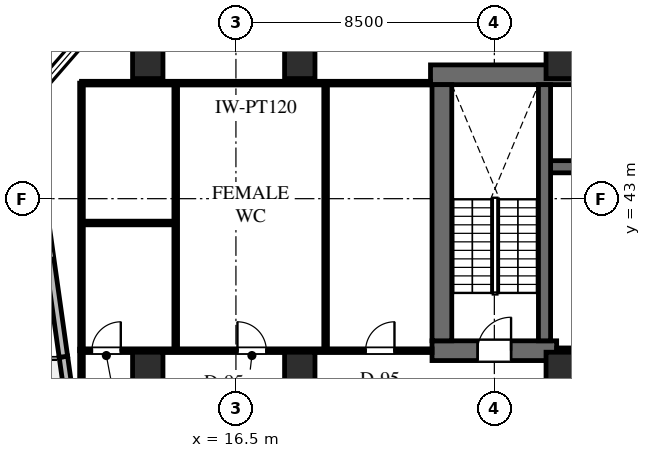
"""IFC4 building model, lengths in metres.
Left out: names, types, materials, properties, quantities, classifications, styles, units other than length and angle.
Written with IfcOpenShell. Run it as: python <this file> out.ifc"""

import sys

from ifc_helpers import new_model, si_unit, direction, frame, frame_2d, origin, origin_2d, place, context, subcontext, project, spatial, rectangle, extrude, element, fill, save


model = new_model("IFC4")
c1 = context("Model", 3, precision=1e-05, world=origin(), true_north=direction((0.0, 1.0)))
c2 = subcontext(c1, "Body", "Model", "MODEL_VIEW")
j1 = project(units=[si_unit("LENGTHUNIT", "METRE"), si_unit("PLANEANGLEUNIT", "RADIAN")], contexts=[c1])
p1 = place(None, origin())
s1 = spatial("IfcSite", under=j1, at=p1, CompositionType="ELEMENT")
p2 = place(p1, origin())
s2 = spatial("IfcBuilding", under=s1, at=p2, CompositionType="ELEMENT")
p3 = place(p2, frame((0.0, 0.0, 96.0)))
s3 = spatial("IfcBuildingStorey", under=s2, at=p3, CompositionType="ELEMENT", Elevation=96.0)
p4 = place(p3, frame((22.9, 47.075, 0.0), z_axis=(0.0, 0.0, 1.0), x_axis=(1.0, 0.0, 0.0)))
e1 = element("IfcWall", 1, at=p4, inside=s3, PredefinedType="SHEAR", context=c2, shape_type="SweptSolid", body=[
    extrude(rectangle(XDim=43.6, YDim=0.65, at=frame_2d((21.8, 0.0))), origin(), (0.0, 0.0, 1.0), 4.0),
])
p5 = place(p3, frame((26.85, 44.05, 0.0), z_axis=(0.0, 0.0, 1.0), x_axis=(1.0, 0.0, 0.0)))
e2 = element("IfcWall", 2, at=p5, inside=s3, PredefinedType="SHEAR", context=c2, shape_type="SweptSolid", body=[
    extrude(rectangle(XDim=7.95, YDim=0.4, at=frame_2d((3.975, 0.0))), origin(), (0.0, 0.0, 1.0), 4.0),
])
p6 = place(p3, frame((22.95, 38.0, 0.0), z_axis=(0.0, 0.0, 1.0), x_axis=(1.0, 0.0, 0.0)))
e3 = element("IfcWall", 3, at=p6, inside=s3, PredefinedType="SHEAR", context=c2, shape_type="SweptSolid", body=[
    extrude(rectangle(XDim=4.1, YDim=0.65, at=frame_2d((2.05, 0.0))), origin(), (0.0, 0.0, 1.0), 4.0),
])
p7 = place(p6, frame((1.5, 0.0, 0.0)))
e4 = element("IfcOpeningElement", 4, at=p7, cuts=e3, PredefinedType="OPENING", context=c2, shape_type="SweptSolid", body=[
    extrude(rectangle(XDim=1.1, YDim=2.2, at=frame_2d((0.55, 1.1))), frame((0.0, 0.335, 0.0), z_axis=(0.0, -1.0, 0.0), x_axis=(1.0, 0.0, 0.0)), (0.0, 0.0, 1.0), 0.67),
])
p8 = place(p3, frame((23.275, 38.325, 0.0), z_axis=(0.0, 0.0, 1.0), x_axis=(0.0, 1.0, 0.0)))
e5 = element("IfcWall", 5, at=p8, inside=s3, PredefinedType="SHEAR", context=c2, shape_type="SweptSolid", body=[
    extrude(rectangle(XDim=8.425, YDim=0.65, at=frame_2d((4.212, 0.0))), origin(), (0.0, 0.0, 1.0), 4.0),
])
p9 = place(p3, frame((26.65, 38.325, 0.0), z_axis=(0.0, 0.0, 1.0), x_axis=(0.0, 1.0, 0.0)))
e6 = element("IfcWall", 6, at=p9, inside=s3, PredefinedType="SHEAR", context=c2, shape_type="SweptSolid", body=[
    extrude(rectangle(XDim=8.425, YDim=0.4, at=frame_2d((4.212, 0.0))), origin(), (0.0, 0.0, 1.0), 4.0),
])
for number, where, z_axis, x_axis in (
    (7, (27.2, 37.35, 0.0), (0.0, 0.0, 1.0), (1.0, 0.0, 0.0)),
    (8, (27.2, 47.55, 0.0), (0.0, 0.0, 1.0), (1.0, 0.0, 0.0)),
    (9, (18.6, 37.35, 0.0), (0.0, 0.0, 1.0), (1.0, 0.0, 0.0)),
    (10, (18.6, 47.55, 0.0), (0.0, 0.0, 1.0), (1.0, 0.0, 0.0)),
    (11, (13.6, 37.35, 0.0), (0.0, 0.0, 1.0), (1.0, 0.0, 0.0)),
    (12, (13.6, 47.55, 0.0), (0.0, 0.0, 1.0), (1.0, 0.0, 0.0)),
):
    element("IfcColumn", number, at=place(p3, frame(where, z_axis=z_axis, x_axis=x_axis)), inside=s3, PredefinedType="COLUMN", context=c2, shape_type="SweptSolid", body=[
        extrude(rectangle(XDim=1.0, YDim=1.2, at=origin_2d()), origin(), (0.0, 0.0, 1.0), 4.0),
    ])
p10 = place(p3, frame((14.938, 8.539, 0.0), z_axis=(0.0, 0.0, 1.0), x_axis=(-0.139178114609, 0.990267364106, 0.0)))
e13 = element("IfcWall", 13, at=p10, inside=s3, PredefinedType="STANDARD", context=c2, shape_type="SweptSolid", body=[
    extrude(rectangle(XDim=29.549, YDim=0.28, at=frame_2d((14.774, 0.0))), origin(), (0.0, 0.0, 1.0), 3.75),
])
p11 = place(p10, frame((14.224, 0.0, 0.0)))
e14 = element("IfcOpeningElement", 14, at=p11, cuts=e13, PredefinedType="OPENING", context=c2, shape_type="SweptSolid", body=[
    extrude(rectangle(XDim=1.1, YDim=2.2, at=frame_2d((0.55, 1.1))), frame((0.0, 0.15, 0.0), z_axis=(0.0, -1.0, 0.0), x_axis=(1.0, 0.0, 0.0)), (0.0, 0.0, 1.0), 0.3),
])
p12 = place(p10, frame((5.172, 0.0, 0.65)))
e15 = element("IfcOpeningElement", 15, at=p12, cuts=e13, PredefinedType="OPENING", context=c2, shape_type="SweptSolid", body=[
    extrude(rectangle(XDim=1.8, YDim=2.1, at=frame_2d((0.9, 1.05))), frame((0.0, 0.15, 0.0), z_axis=(0.0, -1.0, 0.0), x_axis=(1.0, 0.0, 0.0)), (0.0, 0.0, 1.0), 0.3),
])
p13 = place(p3, frame((10.825, 37.8, 0.0), z_axis=(0.0, 0.0, 1.0), x_axis=(-0.139180610108, 0.990267013371, 0.0)))
e16 = element("IfcWall", 16, at=p13, inside=s3, PredefinedType="STANDARD", context=c2, shape_type="SweptSolid", body=[
    extrude(rectangle(XDim=8.467, YDim=0.28, at=frame_2d((4.234, 0.0))), origin(), (0.0, 0.0, 1.0), 3.75),
])
p14 = place(p13, frame((3.273, 0.0, 0.65)))
e17 = element("IfcOpeningElement", 17, at=p14, cuts=e16, PredefinedType="OPENING", context=c2, shape_type="SweptSolid", body=[
    extrude(rectangle(XDim=1.8, YDim=2.1, at=frame_2d((0.9, 1.05))), frame((0.0, 0.15, 0.0), z_axis=(0.0, -1.0, 0.0), x_axis=(1.0, 0.0, 0.0)), (0.0, 0.0, 1.0), 0.3),
])
p15 = place(p3, frame((9.646, 46.185, 0.0), z_axis=(0.0, 0.0, 1.0), x_axis=(0.656070644076, 0.754699483226, 0.0)))
e18 = element("IfcWall", 18, at=p15, inside=s3, PredefinedType="STANDARD", context=c2, shape_type="SweptSolid", body=[
    extrude(rectangle(XDim=2.908, YDim=0.28, at=frame_2d((1.454, 0.0))), origin(), (0.0, 0.0, 1.0), 3.75),
])
p16 = place(p15, frame((0.541, 0.0, 0.65)))
e19 = element("IfcOpeningElement", 19, at=p16, cuts=e18, PredefinedType="OPENING", context=c2, shape_type="SweptSolid", body=[
    extrude(rectangle(XDim=1.8, YDim=2.1, at=frame_2d((0.9, 1.05))), frame((0.0, 0.15, 0.0), z_axis=(0.0, -1.0, 0.0), x_axis=(1.0, 0.0, 0.0)), (0.0, 0.0, 1.0), 0.3),
])
p17 = place(p3, frame((27.05, 38.0, 0.0), z_axis=(0.0, 0.0, 1.0), x_axis=(1.0, 0.0, 0.0)))
e20 = element("IfcWall", 20, at=p17, inside=s3, PredefinedType="STANDARD", context=c2, shape_type="SweptSolid", body=[
    extrude(rectangle(XDim=7.95, YDim=0.18, at=frame_2d((3.975, 0.0))), origin(), (0.0, 0.0, 1.0), 2.894),
])
p18 = place(p17, frame((2.566, 0.0, 0.0)))
e21 = element("IfcOpeningElement", 21, at=p18, cuts=e20, PredefinedType="OPENING", context=c2, shape_type="SweptSolid", body=[
    extrude(rectangle(XDim=1.05, YDim=2.2, at=frame_2d((0.525, 1.1))), frame((0.0, 0.1, 0.0), z_axis=(0.0, -1.0, 0.0), x_axis=(1.0, 0.0, 0.0)), (0.0, 0.0, 1.0), 0.2),
])
p19 = place(p3, frame((11.42, 38.0, 0.0), z_axis=(0.0, 0.0, 1.0), x_axis=(1.0, 0.0, 0.0)))
e22 = element("IfcWall", 22, at=p19, inside=s3, PredefinedType="PARTITIONING", context=c2, shape_type="SweptSolid", body=[
    extrude(rectangle(XDim=11.53, YDim=0.12, at=frame_2d((5.765, 0.0))), origin(), (0.0, 0.0, 1.0), 2.894),
])
p20 = place(p19, frame((0.343, 0.0, 0.0)))
e23 = element("IfcOpeningElement", 23, at=p20, cuts=e22, PredefinedType="OPENING", context=c2, shape_type="SweptSolid", body=[
    extrude(rectangle(XDim=0.95, YDim=2.15, at=frame_2d((0.475, 1.075))), frame((0.0, 0.07, 0.0), z_axis=(0.0, -1.0, 0.0), x_axis=(1.0, 0.0, 0.0)), (0.0, 0.0, 1.0), 0.14),
])
p21 = place(p19, frame((5.13, 0.0, 0.0)))
e24 = element("IfcOpeningElement", 24, at=p21, cuts=e22, PredefinedType="OPENING", context=c2, shape_type="SweptSolid", body=[
    extrude(rectangle(XDim=0.95, YDim=2.15, at=frame_2d((0.475, 1.075))), frame((0.0, 0.07, 0.0), z_axis=(0.0, -1.0, 0.0), x_axis=(1.0, 0.0, 0.0)), (0.0, 0.0, 1.0), 0.14),
])
p22 = place(p19, frame((9.345, 0.0, 0.0)))
e25 = element("IfcOpeningElement", 25, at=p22, cuts=e22, PredefinedType="OPENING", context=c2, shape_type="SweptSolid", body=[
    extrude(rectangle(XDim=0.95, YDim=2.15, at=frame_2d((0.475, 1.075))), frame((0.0, 0.07, 0.0), z_axis=(0.0, -1.0, 0.0), x_axis=(1.0, 0.0, 0.0)), (0.0, 0.0, 1.0), 0.14),
])
p23 = place(p3, frame((11.42, 38.0, 0.0), z_axis=(0.0, 0.0, 1.0), x_axis=(0.0, 1.0, 0.0)))
e26 = element("IfcWall", 26, at=p23, inside=s3, PredefinedType="PARTITIONING", context=c2, shape_type="SweptSolid", body=[
    extrude(rectangle(XDim=8.8, YDim=0.12, at=frame_2d((4.4, 0.0))), origin(), (0.0, 0.0, 1.0), 3.75),
])
p24 = place(p3, frame((11.42, 46.8, 0.0), z_axis=(0.0, 0.0, 1.0), x_axis=(1.0, 0.0, 0.0)))
e27 = element("IfcWall", 27, at=p24, inside=s3, PredefinedType="PARTITIONING", context=c2, shape_type="SweptSolid", body=[
    extrude(rectangle(XDim=11.48, YDim=0.12, at=frame_2d((5.74, 0.0))), origin(), (0.0, 0.0, 1.0), 2.894),
])
for number, where, z_axis, x_axis in (
    (28, (14.52, 38.068, 0.0), (0.0, 0.0, 1.0), (0.0, 1.0, 0.0)),
    (29, (19.45, 38.068, 0.0), (0.0, 0.0, 1.0), (0.0, 1.0, 0.0)),
):
    element("IfcWall", number, at=place(p3, frame(where, z_axis=z_axis, x_axis=x_axis)), inside=s3, PredefinedType="PARTITIONING", context=c2, shape_type="SweptSolid", body=[
        extrude(rectangle(XDim=8.664, YDim=0.12, at=frame_2d((4.332, 0.0))), origin(), (0.0, 0.0, 1.0), 3.75),
    ])
p25 = place(p3, frame((11.488, 42.2, 0.0), z_axis=(0.0, 0.0, 1.0), x_axis=(1.0, 0.0, 0.0)))
e30 = element("IfcWall", 30, at=p25, inside=s3, PredefinedType="PARTITIONING", context=c2, shape_type="SweptSolid", body=[
    extrude(rectangle(XDim=2.964, YDim=0.12, at=frame_2d((1.482, 0.0))), origin(), (0.0, 0.0, 1.0), 2.894),
])
p26 = place(p3, frame((11.42, 34.752, 0.0), z_axis=(0.0, 0.0, 1.0), x_axis=(0.0, 1.0, 0.0)))
e31 = element("IfcWall", 31, at=p26, inside=s3, PredefinedType="PARTITIONING", context=c2, shape_type="SweptSolid", body=[
    extrude(rectangle(XDim=3.298, YDim=0.12, at=frame_2d((1.649, 0.0))), origin(), (0.0, 0.0, 1.0), 3.75),
])
p27 = place(p16, origin())
e32 = element("IfcWindow", 32, at=p27, inside=s3, PartitioningType="SINGLE_PANEL", PredefinedType="WINDOW", context=c2, shape_type="SweptSolid", body=[
    extrude(rectangle(XDim=1.8, YDim=2.1, at=frame_2d((0.9, 1.05))), frame((0.0, 0.03, 0.0), z_axis=(0.0, -1.0, 0.0), x_axis=(1.0, 0.0, 0.0)), (0.0, 0.0, 1.0), 0.06),
])
fill(e19, e32)
p28 = place(p7, origin())
e33 = element("IfcDoor", 33, at=p28, inside=s3, OperationType="SINGLE_SWING_RIGHT", PredefinedType="DOOR", context=c2, shape_type="SweptSolid", body=[
    extrude(rectangle(XDim=1.1, YDim=2.2, at=frame_2d((0.55, 1.1))), frame((0.0, 0.025, 0.0), z_axis=(0.0, -1.0, 0.0), x_axis=(1.0, 0.0, 0.0)), (0.0, 0.0, 1.0), 0.05),
])
fill(e4, e33)
p29 = place(p20, origin())
e34 = element("IfcDoor", 34, at=p29, inside=s3, OperationType="SINGLE_SWING_RIGHT", PredefinedType="DOOR", context=c2, shape_type="SweptSolid", body=[
    extrude(rectangle(XDim=0.95, YDim=2.15, at=frame_2d((0.475, 1.075))), frame((0.0, 0.025, 0.0), z_axis=(0.0, -1.0, 0.0), x_axis=(1.0, 0.0, 0.0)), (0.0, 0.0, 1.0), 0.05),
])
fill(e23, e34)
p30 = place(p21, origin())
e35 = element("IfcDoor", 35, at=p30, inside=s3, OperationType="SINGLE_SWING_LEFT", PredefinedType="DOOR", context=c2, shape_type="SweptSolid", body=[
    extrude(rectangle(XDim=0.95, YDim=2.15, at=frame_2d((0.475, 1.075))), frame((0.0, 0.025, 0.0), z_axis=(0.0, -1.0, 0.0), x_axis=(1.0, 0.0, 0.0)), (0.0, 0.0, 1.0), 0.05),
])
fill(e24, e35)
p31 = place(p22, origin())
e36 = element("IfcDoor", 36, at=p31, inside=s3, OperationType="SINGLE_SWING_RIGHT", PredefinedType="DOOR", context=c2, shape_type="SweptSolid", body=[
    extrude(rectangle(XDim=0.95, YDim=2.15, at=frame_2d((0.475, 1.075))), frame((0.0, 0.025, 0.0), z_axis=(0.0, -1.0, 0.0), x_axis=(1.0, 0.0, 0.0)), (0.0, 0.0, 1.0), 0.05),
])
fill(e25, e36)
save(model, sys.argv[1])
